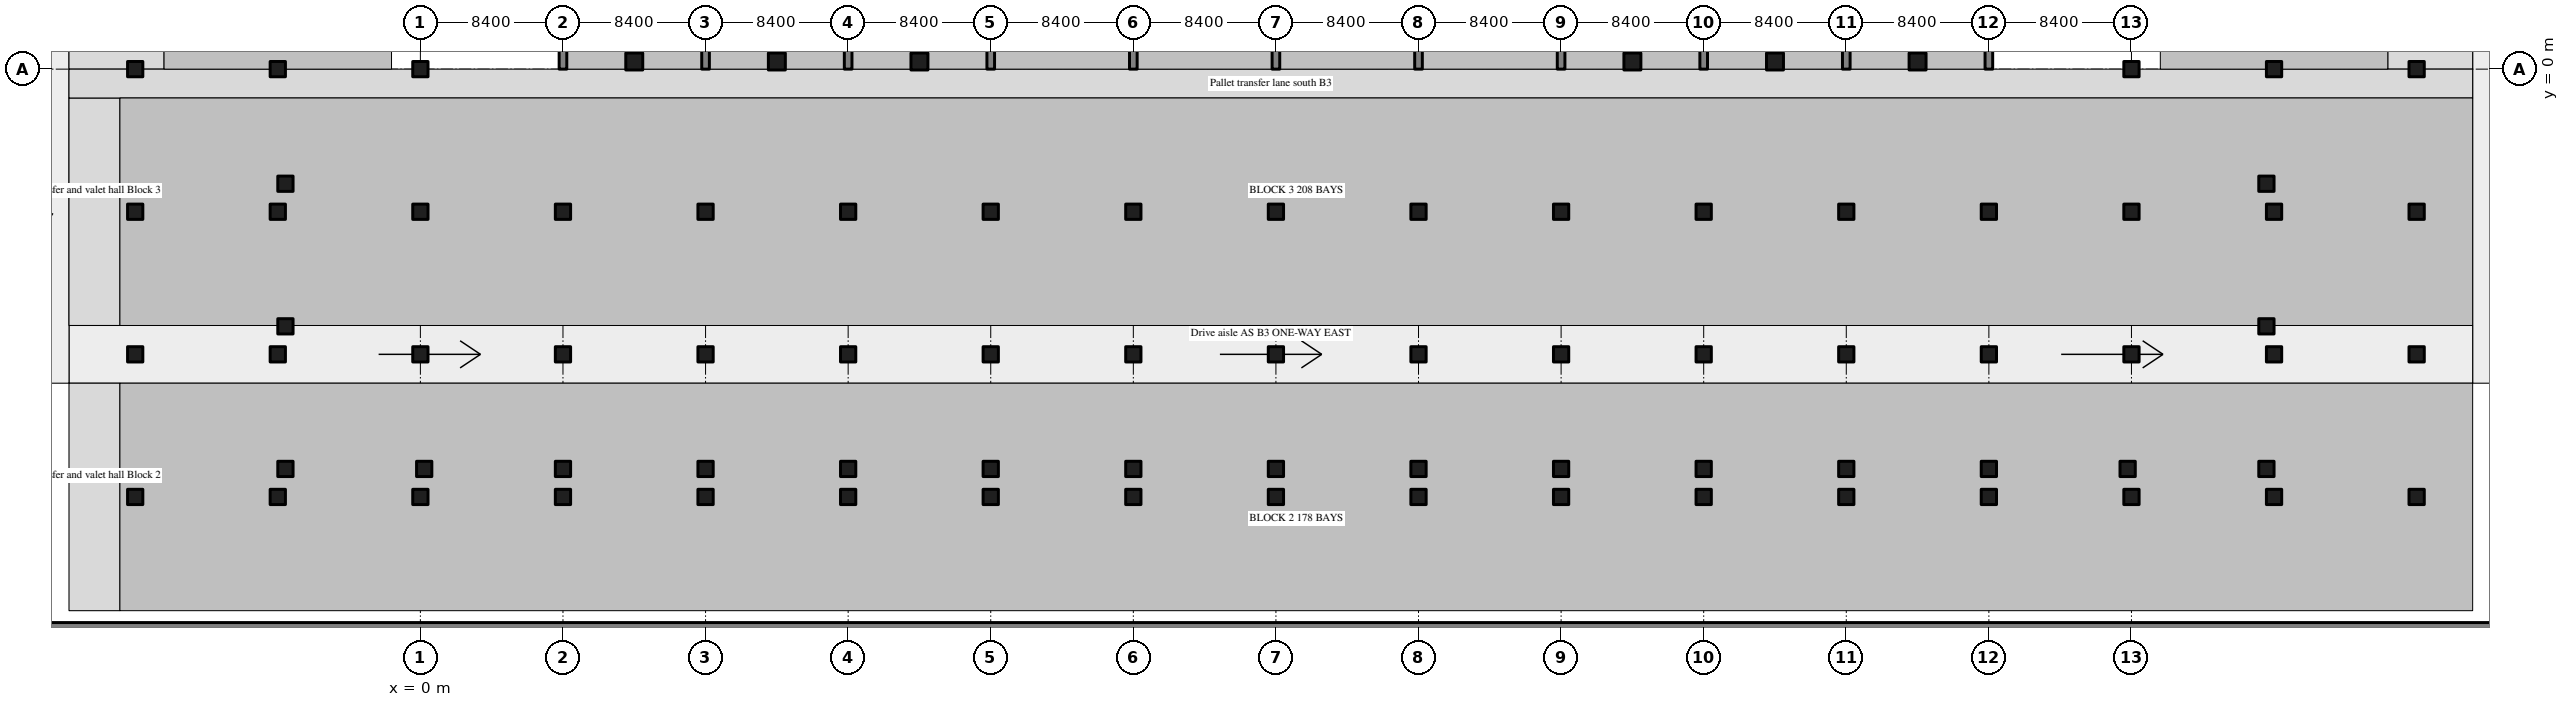
"""IFC4 building model, lengths in metres.
Left out: names, types, materials, properties, quantities, classifications, styles, units other than length and angle.
Written with IfcOpenShell. Run it as: python <this file> out.ifc"""

import sys

from ifc_helpers import new_model, si_unit, direction, frame, frame_2d, origin, origin_2d, place, context, subcontext, project, spatial, rectangle, extrude, source, transform, mapped, element, save


model = new_model("IFC4")
c1 = context("Model", 3, precision=1e-05, world=origin(), true_north=direction((0.0, 1.0)))
c2 = subcontext(c1, "Body", "Model", "MODEL_VIEW")
j1 = project(units=[si_unit("LENGTHUNIT", "METRE"), si_unit("PLANEANGLEUNIT", "RADIAN")], contexts=[c1])
p1 = place(None, origin())
s1 = spatial("IfcSite", under=j1, at=p1, CompositionType="ELEMENT")
p2 = place(p1, origin())
s2 = spatial("IfcBuilding", under=s1, at=p2, CompositionType="ELEMENT")
p3 = place(p2, frame((0.0, 0.0, -13.5)))
s3 = spatial("IfcBuildingStorey", under=s2, at=p3, CompositionType="ELEMENT", Elevation=-13.5)
m1 = source(origin(), c2, "Body", "SweptSolid", [
    extrude(rectangle(XDim=151.2, YDim=1.0, at=frame_2d((75.6, 0.0))), origin(), (0.0, 0.0, 1.0), 4.52),
])
p4 = place(p3, frame((-25.2, -33.1, -0.3), z_axis=(0.0, 0.0, 1.0), x_axis=(1.0, 0.0, 0.0)))
e1 = element("IfcWall", 1, at=p4, inside=s3, PredefinedType="SHEAR", context=c2, shape_type="MappedRepresentation", body=[
    mapped(m1, transform((0.0, 0.0, 0.0), scale=1.0)),
])
m2 = source(origin(), c2, "Body", "SweptSolid", [
    extrude(rectangle(XDim=19.6, YDim=0.45, at=frame_2d((9.8, 0.0))), origin(), (0.0, 0.0, 1.0), 4.52),
])
for number, where, z_axis, x_axis in (
    (2, (8.4, 0.0, -0.3), (0.0, 0.0, 1.0), (0.0, 1.0, 0.0)),
    (3, (16.8, 0.0, -0.3), (0.0, 0.0, 1.0), (0.0, 1.0, 0.0)),
    (4, (25.2, 0.0, -0.3), (0.0, 0.0, 1.0), (0.0, 1.0, 0.0)),
    (5, (33.6, 0.0, -0.3), (0.0, 0.0, 1.0), (0.0, 1.0, 0.0)),
    (6, (42.0, 0.0, -0.3), (0.0, 0.0, 1.0), (0.0, 1.0, 0.0)),
    (7, (50.4, 0.0, -0.3), (0.0, 0.0, 1.0), (0.0, 1.0, 0.0)),
    (8, (58.8, 0.0, -0.3), (0.0, 0.0, 1.0), (0.0, 1.0, 0.0)),
    (9, (67.2, 0.0, -0.3), (0.0, 0.0, 1.0), (0.0, 1.0, 0.0)),
    (10, (75.6, 0.0, -0.3), (0.0, 0.0, 1.0), (0.0, 1.0, 0.0)),
    (11, (84.0, 0.0, -0.3), (0.0, 0.0, 1.0), (0.0, 1.0, 0.0)),
    (12, (92.4, 0.0, -0.3), (0.0, 0.0, 1.0), (0.0, 1.0, 0.0)),
):
    element("IfcWall", number, at=place(p3, frame(where, z_axis=z_axis, x_axis=x_axis)), inside=s3, PredefinedType="SHEAR", context=c2, shape_type="MappedRepresentation", body=[
        mapped(m2, transform((0.0, 0.0, 0.0), scale=1.0)),
    ])
m3 = source(origin(), c2, "Body", "SweptSolid", [
    extrude(rectangle(XDim=1.0, YDim=1.0, at=origin_2d()), origin(), (0.0, 0.0, 1.0), 4.52),
])
for number, where, z_axis, x_axis in (
    (13, (12.6, 0.45, -0.3), (0.0, 0.0, 1.0), (1.0, 0.0, 0.0)),
    (14, (21.0, 0.45, -0.3), (0.0, 0.0, 1.0), (1.0, 0.0, 0.0)),
    (15, (29.4, 0.45, -0.3), (0.0, 0.0, 1.0), (1.0, 0.0, 0.0)),
    (16, (71.4, 0.45, -0.3), (0.0, 0.0, 1.0), (1.0, 0.0, 0.0)),
    (17, (79.8, 0.45, -0.3), (0.0, 0.0, 1.0), (1.0, 0.0, 0.0)),
    (18, (88.2, 0.45, -0.3), (0.0, 0.0, 1.0), (1.0, 0.0, 0.0)),
):
    element("IfcColumn", number, at=place(p3, frame(where, z_axis=z_axis, x_axis=x_axis)), inside=s3, PredefinedType="COLUMN", context=c2, shape_type="MappedRepresentation", body=[
        mapped(m3, transform((0.0, 0.0, 0.0), scale=1.0)),
    ])
m4 = source(origin(), c2, "Body", "SweptSolid", [
    extrude(rectangle(XDim=0.9, YDim=0.9, at=origin_2d()), origin(), (0.0, 0.0, 1.0), 4.52),
])
for number, where, z_axis, x_axis in (
    (19, (-7.95, -23.55, -0.3), (0.0, 0.0, 1.0), (1.0, 0.0, 0.0)),
    (20, (108.75, -23.55, -0.3), (0.0, 0.0, 1.0), (1.0, 0.0, 0.0)),
    (21, (-7.95, -15.15, -0.3), (0.0, 0.0, 1.0), (1.0, 0.0, 0.0)),
    (22, (108.75, -15.15, -0.3), (0.0, 0.0, 1.0), (1.0, 0.0, 0.0)),
    (23, (-7.95, -6.75, -0.3), (0.0, 0.0, 1.0), (1.0, 0.0, 0.0)),
    (24, (108.75, -6.75, -0.3), (0.0, 0.0, 1.0), (1.0, 0.0, 0.0)),
    (25, (0.225, -23.55, -0.3), (0.0, 0.0, 1.0), (1.0, 0.0, 0.0)),
    (26, (8.4, -23.55, -0.3), (0.0, 0.0, 1.0), (1.0, 0.0, 0.0)),
    (27, (16.8, -23.55, -0.3), (0.0, 0.0, 1.0), (1.0, 0.0, 0.0)),
    (28, (25.2, -23.55, -0.3), (0.0, 0.0, 1.0), (1.0, 0.0, 0.0)),
    (29, (33.6, -23.55, -0.3), (0.0, 0.0, 1.0), (1.0, 0.0, 0.0)),
    (30, (42.0, -23.55, -0.3), (0.0, 0.0, 1.0), (1.0, 0.0, 0.0)),
    (31, (50.4, -23.55, -0.3), (0.0, 0.0, 1.0), (1.0, 0.0, 0.0)),
    (32, (58.8, -23.55, -0.3), (0.0, 0.0, 1.0), (1.0, 0.0, 0.0)),
    (33, (67.2, -23.55, -0.3), (0.0, 0.0, 1.0), (1.0, 0.0, 0.0)),
    (34, (75.6, -23.55, -0.3), (0.0, 0.0, 1.0), (1.0, 0.0, 0.0)),
    (35, (84.0, -23.55, -0.3), (0.0, 0.0, 1.0), (1.0, 0.0, 0.0)),
    (36, (92.4, -23.55, -0.3), (0.0, 0.0, 1.0), (1.0, 0.0, 0.0)),
    (37, (100.575, -23.55, -0.3), (0.0, 0.0, 1.0), (1.0, 0.0, 0.0)),
    (38, (-16.8, -25.2, -0.3), (0.0, 0.0, 1.0), (1.0, 0.0, 0.0)),
    (39, (-16.8, -16.8, -0.3), (0.0, 0.0, 1.0), (1.0, 0.0, 0.0)),
    (40, (-16.8, -8.4, -0.3), (0.0, 0.0, 1.0), (1.0, 0.0, 0.0)),
    (41, (-16.8, 0.0, -0.3), (0.0, 0.0, 1.0), (1.0, 0.0, 0.0)),
    (42, (-8.4, -25.2, -0.3), (0.0, 0.0, 1.0), (1.0, 0.0, 0.0)),
    (43, (-8.4, -16.8, -0.3), (0.0, 0.0, 1.0), (1.0, 0.0, 0.0)),
    (44, (-8.4, -8.4, -0.3), (0.0, 0.0, 1.0), (1.0, 0.0, 0.0)),
    (45, (-8.4, 0.0, -0.3), (0.0, 0.0, 1.0), (1.0, 0.0, 0.0)),
    (46, (0.0, -25.2, -0.3), (0.0, 0.0, 1.0), (1.0, 0.0, 0.0)),
    (47, (0.0, -16.8, -0.3), (0.0, 0.0, 1.0), (1.0, 0.0, 0.0)),
    (48, (0.0, -8.4, -0.3), (0.0, 0.0, 1.0), (1.0, 0.0, 0.0)),
    (49, (0.0, 0.0, -0.3), (0.0, 0.0, 1.0), (1.0, 0.0, 0.0)),
    (50, (8.4, -25.2, -0.3), (0.0, 0.0, 1.0), (1.0, 0.0, 0.0)),
    (51, (8.4, -16.8, -0.3), (0.0, 0.0, 1.0), (1.0, 0.0, 0.0)),
    (52, (8.4, -8.4, -0.3), (0.0, 0.0, 1.0), (1.0, 0.0, 0.0)),
    (53, (16.8, -25.2, -0.3), (0.0, 0.0, 1.0), (1.0, 0.0, 0.0)),
    (54, (16.8, -16.8, -0.3), (0.0, 0.0, 1.0), (1.0, 0.0, 0.0)),
    (55, (16.8, -8.4, -0.3), (0.0, 0.0, 1.0), (1.0, 0.0, 0.0)),
    (56, (25.2, -25.2, -0.3), (0.0, 0.0, 1.0), (1.0, 0.0, 0.0)),
    (57, (25.2, -16.8, -0.3), (0.0, 0.0, 1.0), (1.0, 0.0, 0.0)),
    (58, (25.2, -8.4, -0.3), (0.0, 0.0, 1.0), (1.0, 0.0, 0.0)),
    (59, (33.6, -25.2, -0.3), (0.0, 0.0, 1.0), (1.0, 0.0, 0.0)),
    (60, (33.6, -16.8, -0.3), (0.0, 0.0, 1.0), (1.0, 0.0, 0.0)),
    (61, (33.6, -8.4, -0.3), (0.0, 0.0, 1.0), (1.0, 0.0, 0.0)),
    (62, (42.0, -25.2, -0.3), (0.0, 0.0, 1.0), (1.0, 0.0, 0.0)),
    (63, (42.0, -16.8, -0.3), (0.0, 0.0, 1.0), (1.0, 0.0, 0.0)),
    (64, (42.0, -8.4, -0.3), (0.0, 0.0, 1.0), (1.0, 0.0, 0.0)),
    (65, (50.4, -25.2, -0.3), (0.0, 0.0, 1.0), (1.0, 0.0, 0.0)),
    (66, (50.4, -16.8, -0.3), (0.0, 0.0, 1.0), (1.0, 0.0, 0.0)),
    (67, (50.4, -8.4, -0.3), (0.0, 0.0, 1.0), (1.0, 0.0, 0.0)),
    (68, (58.8, -25.2, -0.3), (0.0, 0.0, 1.0), (1.0, 0.0, 0.0)),
    (69, (58.8, -16.8, -0.3), (0.0, 0.0, 1.0), (1.0, 0.0, 0.0)),
    (70, (58.8, -8.4, -0.3), (0.0, 0.0, 1.0), (1.0, 0.0, 0.0)),
    (71, (67.2, -25.2, -0.3), (0.0, 0.0, 1.0), (1.0, 0.0, 0.0)),
    (72, (67.2, -16.8, -0.3), (0.0, 0.0, 1.0), (1.0, 0.0, 0.0)),
    (73, (67.2, -8.4, -0.3), (0.0, 0.0, 1.0), (1.0, 0.0, 0.0)),
    (74, (75.6, -25.2, -0.3), (0.0, 0.0, 1.0), (1.0, 0.0, 0.0)),
    (75, (75.6, -16.8, -0.3), (0.0, 0.0, 1.0), (1.0, 0.0, 0.0)),
    (76, (75.6, -8.4, -0.3), (0.0, 0.0, 1.0), (1.0, 0.0, 0.0)),
    (77, (84.0, -25.2, -0.3), (0.0, 0.0, 1.0), (1.0, 0.0, 0.0)),
    (78, (84.0, -16.8, -0.3), (0.0, 0.0, 1.0), (1.0, 0.0, 0.0)),
    (79, (84.0, -8.4, -0.3), (0.0, 0.0, 1.0), (1.0, 0.0, 0.0)),
    (80, (92.4, -25.2, -0.3), (0.0, 0.0, 1.0), (1.0, 0.0, 0.0)),
    (81, (92.4, -16.8, -0.3), (0.0, 0.0, 1.0), (1.0, 0.0, 0.0)),
    (82, (92.4, -8.4, -0.3), (0.0, 0.0, 1.0), (1.0, 0.0, 0.0)),
    (83, (100.8, -25.2, -0.3), (0.0, 0.0, 1.0), (1.0, 0.0, 0.0)),
    (84, (100.8, -16.8, -0.3), (0.0, 0.0, 1.0), (1.0, 0.0, 0.0)),
    (85, (100.8, -8.4, -0.3), (0.0, 0.0, 1.0), (1.0, 0.0, 0.0)),
    (86, (100.8, 0.0, -0.3), (0.0, 0.0, 1.0), (1.0, 0.0, 0.0)),
    (87, (109.2, -25.2, -0.3), (0.0, 0.0, 1.0), (1.0, 0.0, 0.0)),
    (88, (109.2, -16.8, -0.3), (0.0, 0.0, 1.0), (1.0, 0.0, 0.0)),
    (89, (109.2, -8.4, -0.3), (0.0, 0.0, 1.0), (1.0, 0.0, 0.0)),
    (90, (109.2, 0.0, -0.3), (0.0, 0.0, 1.0), (1.0, 0.0, 0.0)),
    (91, (117.6, -25.2, -0.3), (0.0, 0.0, 1.0), (1.0, 0.0, 0.0)),
    (92, (117.6, -16.8, -0.3), (0.0, 0.0, 1.0), (1.0, 0.0, 0.0)),
    (93, (117.6, -8.4, -0.3), (0.0, 0.0, 1.0), (1.0, 0.0, 0.0)),
    (94, (117.6, 0.0, -0.3), (0.0, 0.0, 1.0), (1.0, 0.0, 0.0)),
):
    element("IfcColumn", number, at=place(p3, frame(where, z_axis=z_axis, x_axis=x_axis)), inside=s3, PredefinedType="COLUMN", context=c2, shape_type="MappedRepresentation", body=[
        mapped(m4, transform((0.0, 0.0, 0.0), scale=1.0)),
    ])
save(model, sys.argv[1])
